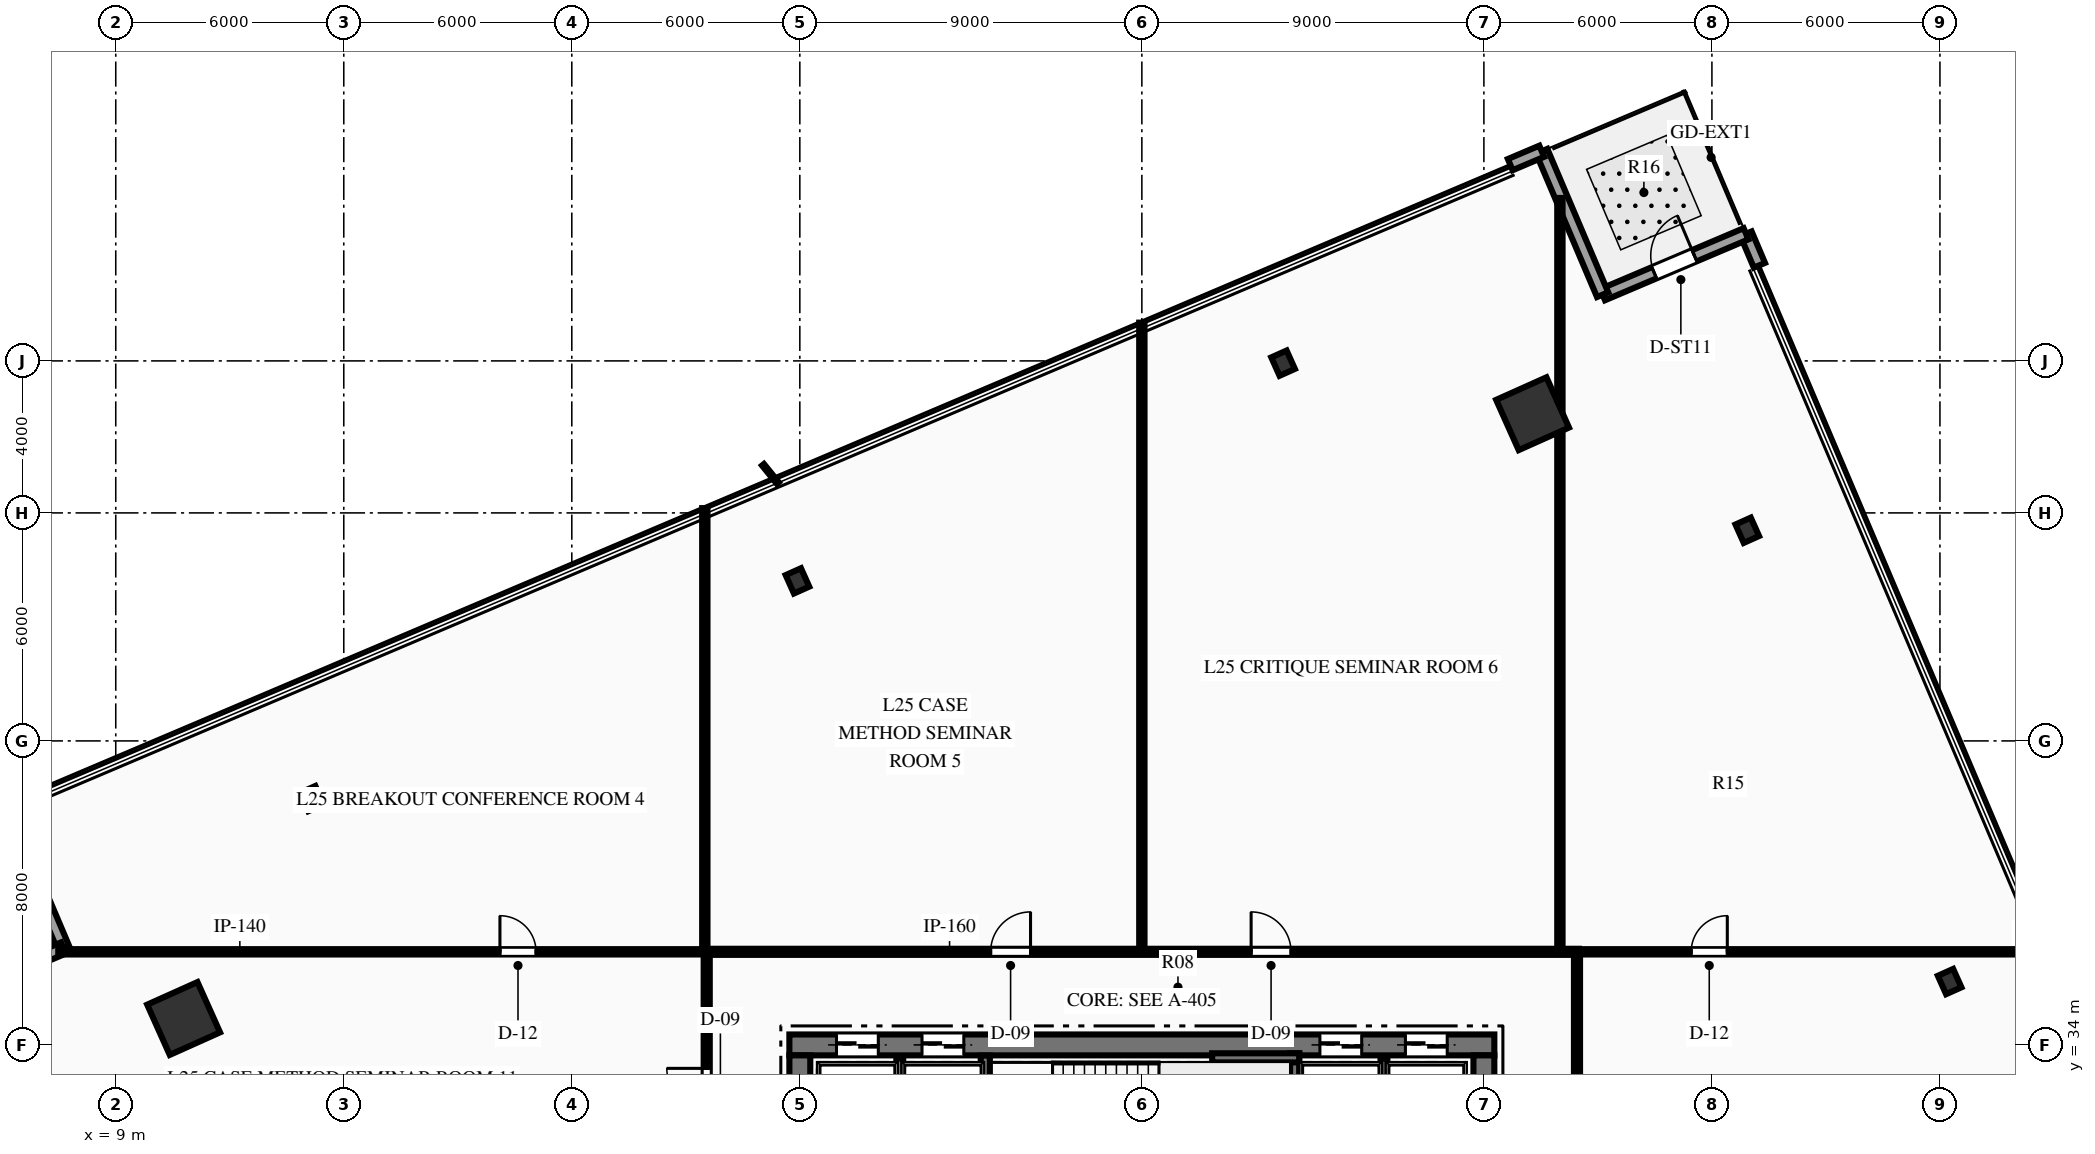
"""IFC4 building model, lengths in metres.
Left out: names, types, materials, properties, quantities, classifications, styles, units other than length and angle.
Written with IfcOpenShell. Run it as: python <this file> out.ifc"""

import sys

from ifc_helpers import new_model, si_unit, direction, frame, frame_2d, origin, origin_2d, place, context, subcontext, project, spatial, rectangle, hollow_rectangle, i_section, extrude, element, fill, save


model = new_model("IFC4")
c1 = context("Model", 3, precision=1e-05, world=origin(), true_north=direction((0.0, 1.0)))
c2 = subcontext(c1, "Body", "Model", "MODEL_VIEW")
j1 = project(units=[si_unit("LENGTHUNIT", "METRE"), si_unit("PLANEANGLEUNIT", "RADIAN")], contexts=[c1])
p1 = place(None, origin())
s1 = spatial("IfcSite", under=j1, at=p1, CompositionType="ELEMENT")
p2 = place(p1, origin())
s2 = spatial("IfcBuilding", under=s1, at=p2, CompositionType="ELEMENT")
p3 = place(p2, frame((0.0, 0.0, 105.45)))
s3 = spatial("IfcBuildingStorey", under=s2, at=p3, CompositionType="ELEMENT", Elevation=105.45)
p4 = place(p3, frame((26.725, 34.0, 0.0), z_axis=(0.0, 0.0, 1.0), x_axis=(1.0, 0.0, 0.0)))
e1 = element("IfcWall", 1, at=p4, inside=s3, PredefinedType="SHEAR", context=c2, shape_type="SweptSolid", body=[
    extrude(rectangle(XDim=18.55, YDim=0.55, at=frame_2d((9.275, 0.0))), origin(), (0.0, 0.0, 1.0), 3.75),
])
p5 = place(p4, frame((1.24, 0.0, 0.0)))
e2 = element("IfcOpeningElement", 2, at=p5, cuts=e1, PredefinedType="OPENING", context=c2, shape_type="SweptSolid", body=[
    extrude(rectangle(XDim=1.1, YDim=2.15, at=frame_2d((0.55, 1.075))), frame((0.0, 0.285, 0.0), z_axis=(0.0, -1.0, 0.0), x_axis=(1.0, 0.0, 0.0)), (0.0, 0.0, 1.0), 0.57),
])
p6 = place(p4, frame((3.49, 0.0, 0.0)))
e3 = element("IfcOpeningElement", 3, at=p6, cuts=e1, PredefinedType="OPENING", context=c2, shape_type="SweptSolid", body=[
    extrude(rectangle(XDim=1.1, YDim=2.15, at=frame_2d((0.55, 1.075))), frame((0.0, 0.285, 0.0), z_axis=(0.0, -1.0, 0.0), x_axis=(1.0, 0.0, 0.0)), (0.0, 0.0, 1.0), 0.57),
])
p7 = place(p4, frame((13.96, 0.0, 0.0)))
e4 = element("IfcOpeningElement", 4, at=p7, cuts=e1, PredefinedType="OPENING", context=c2, shape_type="SweptSolid", body=[
    extrude(rectangle(XDim=1.1, YDim=2.15, at=frame_2d((0.55, 1.075))), frame((0.0, 0.285, 0.0), z_axis=(0.0, -1.0, 0.0), x_axis=(1.0, 0.0, 0.0)), (0.0, 0.0, 1.0), 0.57),
])
p8 = place(p4, frame((16.21, 0.0, 0.0)))
e5 = element("IfcOpeningElement", 5, at=p8, cuts=e1, PredefinedType="OPENING", context=c2, shape_type="SweptSolid", body=[
    extrude(rectangle(XDim=1.1, YDim=2.15, at=frame_2d((0.55, 1.075))), frame((0.0, 0.285, 0.0), z_axis=(0.0, -1.0, 0.0), x_axis=(1.0, 0.0, 0.0)), (0.0, 0.0, 1.0), 0.57),
])
p9 = place(p3, frame((27.0, 18.275, 0.0), z_axis=(0.0, 0.0, 1.0), x_axis=(0.0, 1.0, 0.0)))
e6 = element("IfcWall", 6, at=p9, inside=s3, PredefinedType="SHEAR", context=c2, shape_type="SweptSolid", body=[
    extrude(rectangle(XDim=15.45, YDim=0.55, at=frame_2d((7.725, 0.0))), origin(), (0.0, 0.0, 1.0), 3.75),
])
p10 = place(p9, frame((9.965, 0.0, 0.0)))
e7 = element("IfcOpeningElement", 7, at=p10, cuts=e6, PredefinedType="OPENING", context=c2, shape_type="SweptSolid", body=[
    extrude(rectangle(XDim=1.4, YDim=2.2, at=frame_2d((0.7, 1.1))), frame((0.0, 0.285, 0.0), z_axis=(0.0, -1.0, 0.0), x_axis=(1.0, 0.0, 0.0)), (0.0, 0.0, 1.0), 0.57),
])
p11 = place(p3, frame((45.0, 18.275, 0.0), z_axis=(0.0, 0.0, 1.0), x_axis=(0.0, 1.0, 0.0)))
e8 = element("IfcWall", 8, at=p11, inside=s3, PredefinedType="SHEAR", context=c2, shape_type="SweptSolid", body=[
    extrude(rectangle(XDim=15.45, YDim=0.55, at=frame_2d((7.725, 0.0))), origin(), (0.0, 0.0, 1.0), 3.75),
])
p12 = place(p11, frame((9.965, 0.0, 0.0)))
e9 = element("IfcOpeningElement", 9, at=p12, cuts=e8, PredefinedType="OPENING", context=c2, shape_type="SweptSolid", body=[
    extrude(rectangle(XDim=1.4, YDim=2.2, at=frame_2d((0.7, 1.1))), frame((0.0, 0.285, 0.0), z_axis=(0.0, -1.0, 0.0), x_axis=(1.0, 0.0, 0.0)), (0.0, 0.0, 1.0), 0.57),
])
p13 = place(p3, frame((31.88, 29.93, 0.0), z_axis=(0.0, 0.0, 1.0), x_axis=(0.0, 1.0, 0.0)))
e10 = element("IfcWall", 10, at=p13, inside=s3, PredefinedType="SHEAR", context=c2, shape_type="SweptSolid", body=[
    extrude(rectangle(XDim=3.79, YDim=0.24, at=frame_2d((1.895, 0.0))), origin(), (0.0, 0.0, 1.0), 3.75),
])
p14 = place(p3, frame((40.02, 29.93, 0.0), z_axis=(0.0, 0.0, 1.0), x_axis=(0.0, 1.0, 0.0)))
e11 = element("IfcWall", 11, at=p14, inside=s3, PredefinedType="SHEAR", context=c2, shape_type="SweptSolid", body=[
    extrude(rectangle(XDim=3.85, YDim=0.24, at=frame_2d((1.925, 0.0))), origin(), (0.0, 0.0, 1.0), 3.75),
])
p15 = place(p3, frame((37.85, 33.66, 0.0), z_axis=(0.0, 0.0, 1.0), x_axis=(1.0, 0.0, 0.0)))
e12 = element("IfcWall", 12, at=p15, inside=s3, PredefinedType="SHEAR", context=c2, shape_type="SweptSolid", body=[
    extrude(rectangle(XDim=2.29, YDim=0.24, at=frame_2d((1.145, 0.0))), origin(), (0.0, 0.0, 1.0), 3.75),
])
for number, where, z_axis, x_axis in (
    (13, (46.281, 50.61, 0.0), (0.0, 0.0, 1.0), (0.912, 0.409, 0.0)),
    (14, (10.786, 34.695, 0.0), (0.0, 0.0, 1.0), (0.912, 0.409, 0.0)),
):
    element("IfcColumn", number, at=place(p3, frame(where, z_axis=z_axis, x_axis=x_axis)), inside=s3, PredefinedType="COLUMN", context=c2, shape_type="SweptSolid", body=[
        extrude(hollow_rectangle(XDim=1.45, YDim=1.45, WallThickness=0.07, at=origin_2d()), origin(), (0.0, 0.0, 1.0), 3.75),
    ])
for number, where, z_axis, x_axis in (
    (15, (57.255, 35.667, 0.0), (0.0, 0.0, 1.0), (0.912, 0.409, 0.0)),
    (16, (51.93, 47.543, 0.0), (0.0, 0.0, 1.0), (0.912, 0.409, 0.0)),
    (17, (39.716, 51.941, 0.0), (0.0, 0.0, 1.0), (0.912, 0.409, 0.0)),
    (18, (26.938, 46.211, 0.0), (0.0, 0.0, 1.0), (0.912, 0.409, 0.0)),
    (19, (14.159, 40.482, 0.0), (0.0, 0.0, 1.0), (0.912, 0.409, 0.0)),
):
    element("IfcColumn", number, at=place(p3, frame(where, z_axis=z_axis, x_axis=x_axis)), inside=s3, PredefinedType="COLUMN", context=c2, shape_type="SweptSolid", body=[
        extrude(i_section(OverallWidth=0.442, OverallDepth=0.531, WebThickness=0.066, FlangeThickness=0.106, at=origin_2d()), origin(), (0.0, 0.0, 1.0), 3.75),
    ])
p16 = place(p3, frame((51.898, 55.344, 0.0), z_axis=(0.0, 0.0, 1.0), x_axis=(0.390905112165, -0.920430982357, 0.0)))
e20 = element("IfcWall", 20, at=p16, inside=s3, PredefinedType="STANDARD", context=c2, shape_type="SweptSolid", body=[
    extrude(rectangle(XDim=0.9, YDim=0.32, at=frame_2d((0.45, 0.0))), origin(), (0.0, 0.0, 1.0), 3.45),
])
p17 = place(p3, frame((48.124, 53.743, 0.0), z_axis=(0.0, 0.0, 1.0), x_axis=(0.920525330767, 0.390682883444, 0.0)))
e21 = element("IfcWall", 21, at=p17, inside=s3, PredefinedType="STANDARD", context=c2, shape_type="SweptSolid", body=[
    extrude(rectangle(XDim=4.1, YDim=0.32, at=frame_2d((2.05, 0.0))), origin(), (0.0, 0.0, 1.0), 3.45),
])
p18 = place(p17, frame((1.475, 0.0, 0.0)))
e22 = element("IfcOpeningElement", 22, at=p18, cuts=e21, PredefinedType="OPENING", context=c2, shape_type="SweptSolid", body=[
    extrude(rectangle(XDim=1.15, YDim=2.2, at=frame_2d((0.575, 1.1))), frame((0.0, 0.17, 0.0), z_axis=(0.0, -1.0, 0.0), x_axis=(1.0, 0.0, 0.0)), (0.0, 0.0, 1.0), 0.34),
])
p19 = place(p3, frame((46.522, 57.517, 0.0), z_axis=(0.0, 0.0, 1.0), x_axis=(0.390704299335, -0.920516241292, 0.0)))
e23 = element("IfcWall", 23, at=p19, inside=s3, PredefinedType="STANDARD", context=c2, shape_type="SweptSolid", body=[
    extrude(rectangle(XDim=4.1, YDim=0.32, at=frame_2d((2.05, 0.0))), origin(), (0.0, 0.0, 1.0), 3.45),
])
p20 = place(p3, frame((45.693, 57.165, 0.0), z_axis=(0.0, 0.0, 1.0), x_axis=(0.920569961117, 0.3905777089, 0.0)))
e24 = element("IfcWall", 24, at=p20, inside=s3, PredefinedType="STANDARD", context=c2, shape_type="SweptSolid", body=[
    extrude(rectangle(XDim=0.9, YDim=0.32, at=frame_2d((0.45, 0.0))), origin(), (0.0, 0.0, 1.0), 3.45),
])
p21 = place(p3, frame((7.622, 36.55, 0.0), z_axis=(0.0, 0.0, 1.0), x_axis=(-0.390682883444, 0.920525330767, 0.0)))
e25 = element("IfcWall", 25, at=p21, inside=s3, PredefinedType="STANDARD", context=c2, shape_type="SweptSolid", body=[
    extrude(rectangle(XDim=4.1, YDim=0.32, at=frame_2d((2.05, 0.0))), origin(), (0.0, 0.0, 1.0), 3.45),
])
p22 = place(p3, frame((3.848, 34.948, 0.0), z_axis=(0.0, 0.0, 1.0), x_axis=(0.920516241292, 0.390704299335, 0.0)))
e26 = element("IfcWall", 26, at=p22, inside=s3, PredefinedType="STANDARD", context=c2, shape_type="SweptSolid", body=[
    extrude(rectangle(XDim=4.1, YDim=0.32, at=frame_2d((2.05, 0.0))), origin(), (0.0, 0.0, 1.0), 3.45),
])
p23 = place(p22, frame((1.3, 0.0, 0.85)))
e27 = element("IfcOpeningElement", 27, at=p23, cuts=e26, PredefinedType="OPENING", context=c2, shape_type="SweptSolid", body=[
    extrude(rectangle(XDim=1.5, YDim=2.1, at=frame_2d((0.75, 1.05))), frame((0.0, 0.17, 0.0), z_axis=(0.0, -1.0, 0.0), x_axis=(1.0, 0.0, 0.0)), (0.0, 0.0, 1.0), 0.34),
])
for number, where, z_axis, x_axis in (
    (28, (29.63, 29.9, 0.0), (0.0, 0.0, 1.0), (0.0, 1.0, 0.0)),
    (29, (42.37, 29.9, 0.0), (0.0, 0.0, 1.0), (0.0, 1.0, 0.0)),
):
    element("IfcWall", number, at=place(p3, frame(where, z_axis=z_axis, x_axis=x_axis)), inside=s3, PredefinedType="PARTITIONING", context=c2, shape_type="SweptSolid", body=[
        extrude(rectangle(XDim=3.75, YDim=0.18, at=frame_2d((1.875, 0.0))), origin(), (0.0, 0.0, 1.0), 3.45),
    ])
p24 = place(p3, frame((24.5, 36.45, 0.0), z_axis=(0.0, 0.0, 1.0), x_axis=(1.0, 0.0, 0.0)))
e30 = element("IfcWall", 30, at=p24, inside=s3, PredefinedType="PARTITIONING", context=c2, shape_type="SweptSolid", body=[
    extrude(rectangle(XDim=23.0, YDim=0.16, at=frame_2d((11.5, 0.0))), origin(), (0.0, 0.0, 1.0), 3.45),
])
p25 = place(p24, frame((7.521, 0.0, 0.0)))
e31 = element("IfcOpeningElement", 31, at=p25, cuts=e30, PredefinedType="OPENING", context=c2, shape_type="SweptSolid", body=[
    extrude(rectangle(XDim=1.05, YDim=2.15, at=frame_2d((0.525, 1.075))), frame((0.0, 0.09, 0.0), z_axis=(0.0, -1.0, 0.0), x_axis=(1.0, 0.0, 0.0)), (0.0, 0.0, 1.0), 0.18),
])
p26 = place(p24, frame((14.375, 0.0, 0.0)))
e32 = element("IfcOpeningElement", 32, at=p26, cuts=e30, PredefinedType="OPENING", context=c2, shape_type="SweptSolid", body=[
    extrude(rectangle(XDim=1.05, YDim=2.15, at=frame_2d((0.525, 1.075))), frame((0.0, 0.09, 0.0), z_axis=(0.0, -1.0, 0.0), x_axis=(1.0, 0.0, 0.0)), (0.0, 0.0, 1.0), 0.18),
])
p27 = place(p3, frame((24.55, 15.55, 0.0), z_axis=(0.0, 0.0, 1.0), x_axis=(0.0, 1.0, 0.0)))
e33 = element("IfcWall", 33, at=p27, inside=s3, PredefinedType="PARTITIONING", context=c2, shape_type="SweptSolid", body=[
    extrude(rectangle(XDim=20.9, YDim=0.16, at=frame_2d((10.45, 0.0))), origin(), (0.0, 0.0, 1.0), 3.45),
])
p28 = place(p27, frame((3.067, 0.0, 0.0)))
e34 = element("IfcOpeningElement", 34, at=p28, cuts=e33, PredefinedType="OPENING", context=c2, shape_type="SweptSolid", body=[
    extrude(rectangle(XDim=1.05, YDim=2.15, at=frame_2d((0.525, 1.075))), frame((0.0, 0.09, 0.0), z_axis=(0.0, -1.0, 0.0), x_axis=(1.0, 0.0, 0.0)), (0.0, 0.0, 1.0), 0.18),
])
p29 = place(p27, frame((8.625, 0.0, 0.0)))
e35 = element("IfcOpeningElement", 35, at=p29, cuts=e33, PredefinedType="OPENING", context=c2, shape_type="SweptSolid", body=[
    extrude(rectangle(XDim=1.05, YDim=2.15, at=frame_2d((0.525, 1.075))), frame((0.0, 0.09, 0.0), z_axis=(0.0, -1.0, 0.0), x_axis=(1.0, 0.0, 0.0)), (0.0, 0.0, 1.0), 0.18),
])
p30 = place(p27, frame((12.245, 0.0, 0.0)))
e36 = element("IfcOpeningElement", 36, at=p30, cuts=e33, PredefinedType="OPENING", context=c2, shape_type="SweptSolid", body=[
    extrude(rectangle(XDim=1.05, YDim=2.15, at=frame_2d((0.525, 1.075))), frame((0.0, 0.09, 0.0), z_axis=(0.0, -1.0, 0.0), x_axis=(1.0, 0.0, 0.0)), (0.0, 0.0, 1.0), 0.18),
])
p31 = place(p27, frame((16.783, 0.0, 0.0)))
e37 = element("IfcOpeningElement", 37, at=p31, cuts=e33, PredefinedType="OPENING", context=c2, shape_type="SweptSolid", body=[
    extrude(rectangle(XDim=1.05, YDim=2.15, at=frame_2d((0.525, 1.075))), frame((0.0, 0.09, 0.0), z_axis=(0.0, -1.0, 0.0), x_axis=(1.0, 0.0, 0.0)), (0.0, 0.0, 1.0), 0.18),
])
p32 = place(p3, frame((47.45, 15.55, 0.0), z_axis=(0.0, 0.0, 1.0), x_axis=(0.0, 1.0, 0.0)))
e38 = element("IfcWall", 38, at=p32, inside=s3, PredefinedType="PARTITIONING", context=c2, shape_type="SweptSolid", body=[
    extrude(rectangle(XDim=20.9, YDim=0.16, at=frame_2d((10.45, 0.0))), origin(), (0.0, 0.0, 1.0), 3.45),
])
p33 = place(p32, frame((7.417, 0.0, 0.0)))
e39 = element("IfcOpeningElement", 39, at=p33, cuts=e38, PredefinedType="OPENING", context=c2, shape_type="SweptSolid", body=[
    extrude(rectangle(XDim=1.05, YDim=2.15, at=frame_2d((0.525, 1.075))), frame((0.0, 0.09, 0.0), z_axis=(0.0, -1.0, 0.0), x_axis=(1.0, 0.0, 0.0)), (0.0, 0.0, 1.0), 0.18),
])
p34 = place(p3, frame((7.488, 36.45, 0.0), z_axis=(0.0, 0.0, 1.0), x_axis=(1.0, 0.0, 0.0)))
e40 = element("IfcWall", 40, at=p34, inside=s3, PredefinedType="PARTITIONING", context=c2, shape_type="SweptSolid", body=[
    extrude(rectangle(XDim=17.062, YDim=0.14, at=frame_2d((8.531, 0.0))), origin(), (0.0, 0.0, 1.0), 3.45),
])
p35 = place(p34, frame((11.622, 0.0, 0.0)))
e41 = element("IfcOpeningElement", 41, at=p35, cuts=e40, PredefinedType="OPENING", context=c2, shape_type="SweptSolid", body=[
    extrude(rectangle(XDim=0.95, YDim=2.15, at=frame_2d((0.475, 1.075))), frame((0.0, 0.08, 0.0), z_axis=(0.0, -1.0, 0.0), x_axis=(1.0, 0.0, 0.0)), (0.0, 0.0, 1.0), 0.16),
])
p36 = place(p3, frame((47.45, 36.45, 0.0), z_axis=(0.0, 0.0, 1.0), x_axis=(1.0, 0.0, 0.0)))
e42 = element("IfcWall", 42, at=p36, inside=s3, PredefinedType="PARTITIONING", context=c2, shape_type="SweptSolid", body=[
    extrude(rectangle(XDim=12.425, YDim=0.14, at=frame_2d((6.212, 0.0))), origin(), (0.0, 0.0, 1.0), 3.45),
])
p37 = place(p36, frame((3.005, 0.0, 0.0)))
e43 = element("IfcOpeningElement", 43, at=p37, cuts=e42, PredefinedType="OPENING", context=c2, shape_type="SweptSolid", body=[
    extrude(rectangle(XDim=0.95, YDim=2.15, at=frame_2d((0.475, 1.075))), frame((0.0, 0.08, 0.0), z_axis=(0.0, -1.0, 0.0), x_axis=(1.0, 0.0, 0.0)), (0.0, 0.0, 1.0), 0.16),
])
p38 = place(p3, frame((24.5, 36.45, 0.0), z_axis=(0.0, 0.0, 1.0), x_axis=(0.0, 1.0, 0.0)))
e44 = element("IfcWall", 44, at=p38, inside=s3, PredefinedType="PARTITIONING", context=c2, shape_type="SweptSolid", body=[
    extrude(rectangle(XDim=11.676, YDim=0.14, at=frame_2d((5.838, 0.0))), origin(), (0.0, 0.0, 1.0), 3.45),
])
p39 = place(p3, frame((36.0, 36.45, 0.0), z_axis=(0.0, 0.0, 1.0), x_axis=(0.0, 1.0, 0.0)))
e45 = element("IfcWall", 45, at=p39, inside=s3, PredefinedType="PARTITIONING", context=c2, shape_type="SweptSolid", body=[
    extrude(rectangle(XDim=16.557, YDim=0.14, at=frame_2d((8.279, 0.0))), origin(), (0.0, 0.0, 1.0), 3.45),
])
p40 = place(p3, frame((47.0, 36.45, 0.0), z_axis=(0.0, 0.0, 1.0), x_axis=(0.0, 1.0, 0.0)))
e46 = element("IfcWall", 46, at=p40, inside=s3, PredefinedType="PARTITIONING", context=c2, shape_type="SweptSolid", body=[
    extrude(rectangle(XDim=19.838, YDim=0.14, at=frame_2d((9.919, 0.0))), origin(), (0.0, 0.0, 1.0), 3.45),
])
p41 = place(p18, origin())
e47 = element("IfcDoor", 47, at=p41, inside=s3, OperationType="SINGLE_SWING_RIGHT", PredefinedType="DOOR", context=c2, shape_type="SweptSolid", body=[
    extrude(rectangle(XDim=1.15, YDim=2.2, at=frame_2d((0.575, 1.1))), frame((0.0, 0.025, 0.0), z_axis=(0.0, -1.0, 0.0), x_axis=(1.0, 0.0, 0.0)), (0.0, 0.0, 1.0), 0.05),
])
fill(e22, e47)
p42 = place(p35, origin())
e48 = element("IfcDoor", 48, at=p42, inside=s3, OperationType="SINGLE_SWING_LEFT", PredefinedType="DOOR", context=c2, shape_type="SweptSolid", body=[
    extrude(rectangle(XDim=0.95, YDim=2.15, at=frame_2d((0.475, 1.075))), frame((0.0, 0.025, 0.0), z_axis=(0.0, -1.0, 0.0), x_axis=(1.0, 0.0, 0.0)), (0.0, 0.0, 1.0), 0.05),
])
fill(e41, e48)
p43 = place(p25, origin())
e49 = element("IfcDoor", 49, at=p43, inside=s3, OperationType="SINGLE_SWING_RIGHT", PredefinedType="DOOR", context=c2, shape_type="SweptSolid", body=[
    extrude(rectangle(XDim=1.05, YDim=2.15, at=frame_2d((0.525, 1.075))), frame((0.0, 0.025, 0.0), z_axis=(0.0, -1.0, 0.0), x_axis=(1.0, 0.0, 0.0)), (0.0, 0.0, 1.0), 0.05),
])
fill(e31, e49)
p44 = place(p26, origin())
e50 = element("IfcDoor", 50, at=p44, inside=s3, OperationType="SINGLE_SWING_LEFT", PredefinedType="DOOR", context=c2, shape_type="SweptSolid", body=[
    extrude(rectangle(XDim=1.05, YDim=2.15, at=frame_2d((0.525, 1.075))), frame((0.0, 0.025, 0.0), z_axis=(0.0, -1.0, 0.0), x_axis=(1.0, 0.0, 0.0)), (0.0, 0.0, 1.0), 0.05),
])
fill(e32, e50)
p45 = place(p37, origin())
e51 = element("IfcDoor", 51, at=p45, inside=s3, OperationType="SINGLE_SWING_RIGHT", PredefinedType="DOOR", context=c2, shape_type="SweptSolid", body=[
    extrude(rectangle(XDim=0.95, YDim=2.15, at=frame_2d((0.475, 1.075))), frame((0.0, 0.025, 0.0), z_axis=(0.0, -1.0, 0.0), x_axis=(1.0, 0.0, 0.0)), (0.0, 0.0, 1.0), 0.05),
])
fill(e43, e51)
p46 = place(p31, origin())
e52 = element("IfcDoor", 52, at=p46, inside=s3, OperationType="SINGLE_SWING_RIGHT", PredefinedType="DOOR", context=c2, shape_type="SweptSolid", body=[
    extrude(rectangle(XDim=1.05, YDim=2.15, at=frame_2d((0.525, 1.075))), frame((0.0, 0.025, 0.0), z_axis=(0.0, -1.0, 0.0), x_axis=(1.0, 0.0, 0.0)), (0.0, 0.0, 1.0), 0.05),
])
fill(e37, e52)
p47 = place(p5, origin())
e53 = element("IfcDoor", 53, at=p47, inside=s3, OperationType="SLIDING_TO_LEFT", PredefinedType="DOOR", context=c2, shape_type="SweptSolid", body=[
    extrude(rectangle(XDim=1.1, YDim=2.15, at=frame_2d((0.55, 1.075))), frame((0.0, 0.025, 0.0), z_axis=(0.0, -1.0, 0.0), x_axis=(1.0, 0.0, 0.0)), (0.0, 0.0, 1.0), 0.05),
])
fill(e2, e53)
p48 = place(p6, origin())
e54 = element("IfcDoor", 54, at=p48, inside=s3, OperationType="SLIDING_TO_LEFT", PredefinedType="DOOR", context=c2, shape_type="SweptSolid", body=[
    extrude(rectangle(XDim=1.1, YDim=2.15, at=frame_2d((0.55, 1.075))), frame((0.0, 0.025, 0.0), z_axis=(0.0, -1.0, 0.0), x_axis=(1.0, 0.0, 0.0)), (0.0, 0.0, 1.0), 0.05),
])
fill(e3, e54)
p49 = place(p7, origin())
e55 = element("IfcDoor", 55, at=p49, inside=s3, OperationType="SLIDING_TO_LEFT", PredefinedType="DOOR", context=c2, shape_type="SweptSolid", body=[
    extrude(rectangle(XDim=1.1, YDim=2.15, at=frame_2d((0.55, 1.075))), frame((0.0, 0.025, 0.0), z_axis=(0.0, -1.0, 0.0), x_axis=(1.0, 0.0, 0.0)), (0.0, 0.0, 1.0), 0.05),
])
fill(e4, e55)
p50 = place(p8, origin())
e56 = element("IfcDoor", 56, at=p50, inside=s3, OperationType="SLIDING_TO_LEFT", PredefinedType="DOOR", context=c2, shape_type="SweptSolid", body=[
    extrude(rectangle(XDim=1.1, YDim=2.15, at=frame_2d((0.55, 1.075))), frame((0.0, 0.025, 0.0), z_axis=(0.0, -1.0, 0.0), x_axis=(1.0, 0.0, 0.0)), (0.0, 0.0, 1.0), 0.05),
])
fill(e5, e56)
save(model, sys.argv[1])
